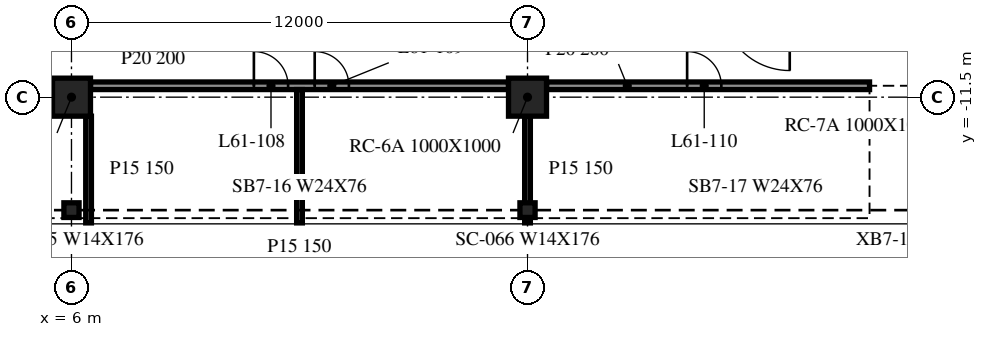
"""IFC4 building model, lengths in metres.
Left out: names, types, materials, properties, quantities, classifications, styles, units other than length and angle.
Written with IfcOpenShell. Run it as: python <this file> out.ifc"""

import sys

from ifc_helpers import new_model, si_unit, direction, frame, frame_2d, origin, origin_2d, place, context, subcontext, project, spatial, rectangle, i_section, extrude, element, fill, save


model = new_model("IFC4")
c1 = context("Model", 3, precision=1e-05, world=origin(), true_north=direction((0.0, 1.0)))
c2 = subcontext(c1, "Body", "Model", "MODEL_VIEW")
j1 = project(units=[si_unit("LENGTHUNIT", "METRE"), si_unit("PLANEANGLEUNIT", "RADIAN")], contexts=[c1])
p1 = place(None, origin())
s1 = spatial("IfcSite", under=j1, at=p1, CompositionType="ELEMENT")
p2 = place(p1, origin())
s2 = spatial("IfcBuilding", under=s1, at=p2, CompositionType="ELEMENT")
p3 = place(p2, frame((0.0, 0.0, 251.4)))
s3 = spatial("IfcBuildingStorey", under=s2, at=p3, CompositionType="ELEMENT", Elevation=251.4)
for number, where, z_axis, x_axis in (
    (1, (6.0, -11.5, -0.34), (0.0, 0.0, 1.0), (1.0, 0.0, 0.0)),
    (2, (18.0, -11.5, -0.34), (0.0, 0.0, 1.0), (1.0, 0.0, 0.0)),
):
    element("IfcColumn", number, at=place(p3, frame(where, z_axis=z_axis, x_axis=x_axis)), inside=s3, PredefinedType="COLUMN", context=c2, shape_type="SweptSolid", body=[
        extrude(rectangle(XDim=1.0, YDim=1.0, at=origin_2d()), origin(), (0.0, 0.0, 1.0), 3.8),
    ])
for number, where, z_axis, x_axis in (
    (3, (6.0, -14.473, -0.34), (0.0, 0.0, 1.0), (1.0, 0.0, 0.0)),
    (4, (18.0, -14.473, -0.34), (0.0, 0.0, 1.0), (1.0, 0.0, 0.0)),
):
    element("IfcColumn", number, at=place(p3, frame(where, z_axis=z_axis, x_axis=x_axis)), inside=s3, PredefinedType="COLUMN", context=c2, shape_type="SweptSolid", body=[
        extrude(i_section(OverallWidth=0.399, OverallDepth=0.386, WebThickness=0.021, FlangeThickness=0.033, at=origin_2d()), origin(), (0.0, 0.0, 1.0), 3.8),
    ])
p4 = place(p3, frame((6.5, -11.2, 0.0), z_axis=(0.0, 0.0, 1.0), x_axis=(1.0, 0.0, 0.0)))
e5 = element("IfcWall", 5, at=p4, inside=s3, PredefinedType="PARTITIONING", context=c2, shape_type="SweptSolid", body=[
    extrude(rectangle(XDim=11.0, YDim=0.2, at=frame_2d((5.5, 0.0))), origin(), (0.0, 0.0, 1.0), 3.46),
])
p5 = place(p4, frame((4.3, 0.0, 0.0)))
e6 = element("IfcOpeningElement", 6, at=p5, cuts=e5, PredefinedType="OPENING", context=c2, shape_type="SweptSolid", body=[
    extrude(rectangle(XDim=0.9, YDim=2.1, at=frame_2d((0.45, 1.05))), frame((0.0, 0.11, 0.0), z_axis=(0.0, -1.0, 0.0), x_axis=(1.0, 0.0, 0.0)), (0.0, 0.0, 1.0), 0.22),
])
p6 = place(p4, frame((5.9, 0.0, 0.0)))
e7 = element("IfcOpeningElement", 7, at=p6, cuts=e5, PredefinedType="OPENING", context=c2, shape_type="SweptSolid", body=[
    extrude(rectangle(XDim=0.9, YDim=2.1, at=frame_2d((0.45, 1.05))), frame((0.0, 0.11, 0.0), z_axis=(0.0, -1.0, 0.0), x_axis=(1.0, 0.0, 0.0)), (0.0, 0.0, 1.0), 0.22),
])
p7 = place(p3, frame((18.5, -11.2, 0.0), z_axis=(0.0, 0.0, 1.0), x_axis=(1.0, 0.0, 0.0)))
e8 = element("IfcWall", 8, at=p7, inside=s3, PredefinedType="PARTITIONING", context=c2, shape_type="SweptSolid", body=[
    extrude(rectangle(XDim=8.5, YDim=0.2, at=frame_2d((4.25, 0.0))), origin(), (0.0, 0.0, 1.0), 3.46),
])
p8 = place(p7, frame((3.7, 0.0, 0.0)))
e9 = element("IfcOpeningElement", 9, at=p8, cuts=e8, PredefinedType="OPENING", context=c2, shape_type="SweptSolid", body=[
    extrude(rectangle(XDim=0.9, YDim=2.1, at=frame_2d((0.45, 1.05))), frame((0.0, 0.11, 0.0), z_axis=(0.0, -1.0, 0.0), x_axis=(1.0, 0.0, 0.0)), (0.0, 0.0, 1.0), 0.22),
])
p9 = place(p3, frame((6.45, -14.809, 0.0), z_axis=(0.0, 0.0, 1.0), x_axis=(0.0, 1.0, 0.0)))
e10 = element("IfcWall", 10, at=p9, inside=s3, PredefinedType="PARTITIONING", context=c2, shape_type="SweptSolid", body=[
    extrude(rectangle(XDim=2.809, YDim=0.15, at=frame_2d((1.405, 0.0))), origin(), (0.0, 0.0, 1.0), 3.46),
])
p10 = place(p3, frame((12.0, -14.809, 0.0), z_axis=(0.0, 0.0, 1.0), x_axis=(0.0, 1.0, 0.0)))
e11 = element("IfcWall", 11, at=p10, inside=s3, PredefinedType="PARTITIONING", context=c2, shape_type="SweptSolid", body=[
    extrude(rectangle(XDim=3.509, YDim=0.15, at=frame_2d((1.754, 0.0))), origin(), (0.0, 0.0, 1.0), 3.46),
])
p11 = place(p3, frame((18.0, -14.809, 0.0), z_axis=(0.0, 0.0, 1.0), x_axis=(0.0, 1.0, 0.0)))
e12 = element("IfcWall", 12, at=p11, inside=s3, PredefinedType="PARTITIONING", context=c2, shape_type="SweptSolid", body=[
    extrude(rectangle(XDim=2.809, YDim=0.15, at=frame_2d((1.405, 0.0))), origin(), (0.0, 0.0, 1.0), 3.46),
])
p12 = place(p5, origin())
e13 = element("IfcDoor", 13, at=p12, inside=s3, OperationType="SINGLE_SWING_RIGHT", PredefinedType="DOOR", context=c2, shape_type="SweptSolid", body=[
    extrude(rectangle(XDim=0.9, YDim=2.1, at=frame_2d((0.45, 1.05))), frame((0.0, 0.025, 0.0), z_axis=(0.0, -1.0, 0.0), x_axis=(1.0, 0.0, 0.0)), (0.0, 0.0, 1.0), 0.05),
])
fill(e6, e13)
p13 = place(p6, origin())
e14 = element("IfcDoor", 14, at=p13, inside=s3, OperationType="SINGLE_SWING_LEFT", PredefinedType="DOOR", context=c2, shape_type="SweptSolid", body=[
    extrude(rectangle(XDim=0.9, YDim=2.1, at=frame_2d((0.45, 1.05))), frame((0.0, 0.025, 0.0), z_axis=(0.0, -1.0, 0.0), x_axis=(1.0, 0.0, 0.0)), (0.0, 0.0, 1.0), 0.05),
])
fill(e7, e14)
p14 = place(p8, origin())
e15 = element("IfcDoor", 15, at=p14, inside=s3, OperationType="SINGLE_SWING_RIGHT", PredefinedType="DOOR", context=c2, shape_type="SweptSolid", body=[
    extrude(rectangle(XDim=0.9, YDim=2.1, at=frame_2d((0.45, 1.05))), frame((0.0, 0.025, 0.0), z_axis=(0.0, -1.0, 0.0), x_axis=(1.0, 0.0, 0.0)), (0.0, 0.0, 1.0), 0.05),
])
fill(e9, e15)
save(model, sys.argv[1])
